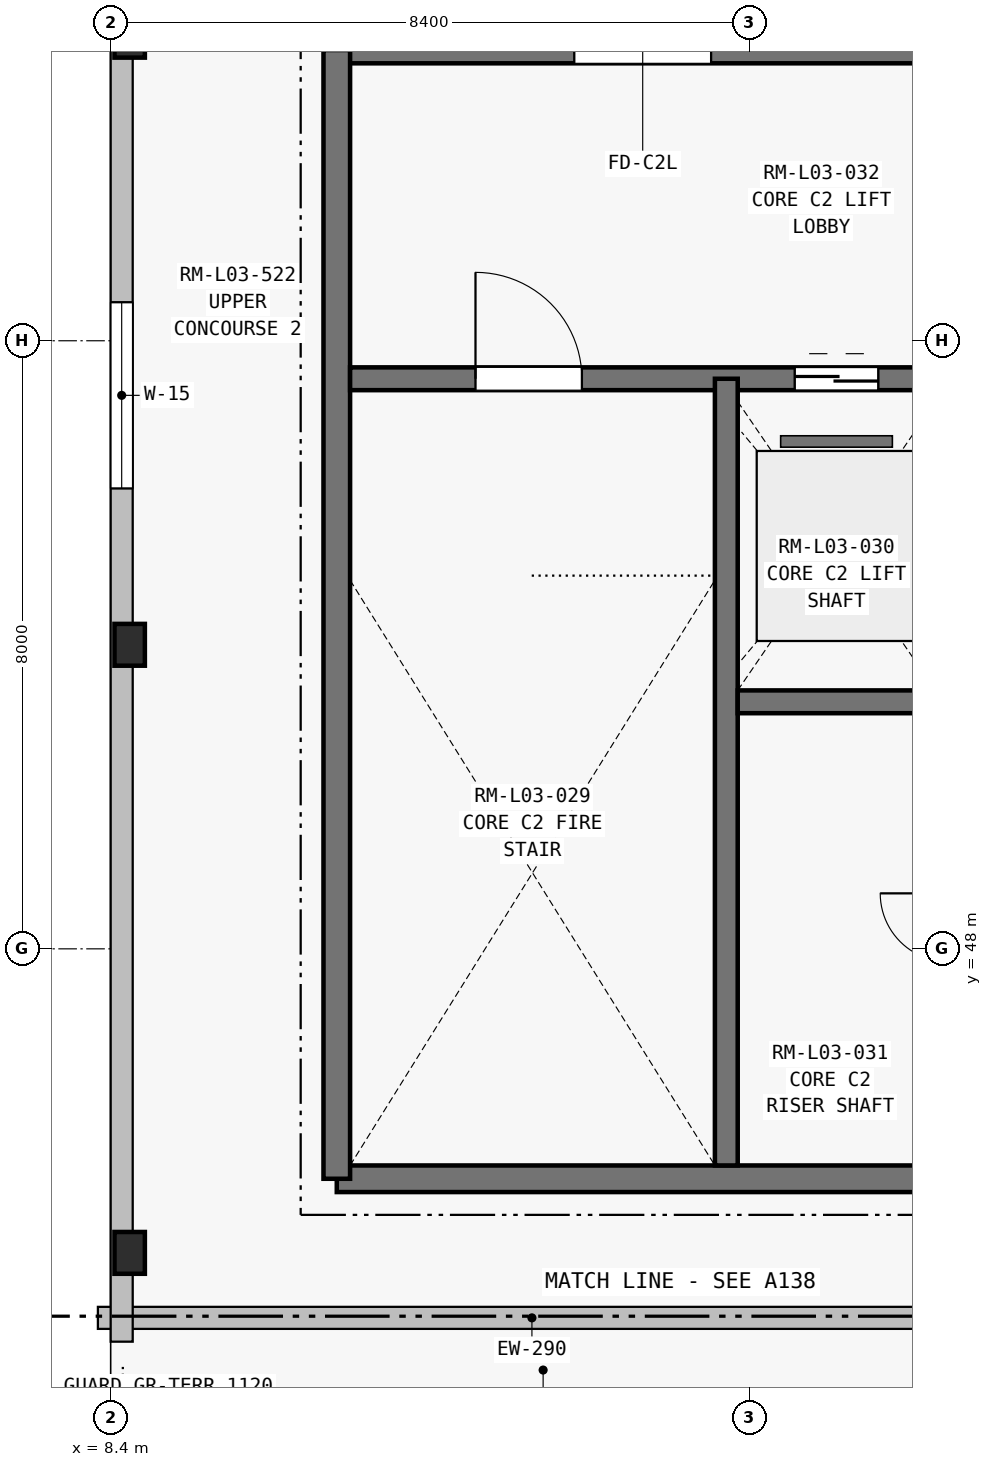
"""IFC4 building model, lengths in metres.
Left out: names, types, materials, properties, quantities, classifications, styles, units other than length and angle.
Written with IfcOpenShell. Run it as: python <this file> out.ifc"""

import sys

from ifc_helpers import new_model, si_unit, direction, frame, frame_2d, origin, origin_2d, place, context, subcontext, project, spatial, rectangle, extrude, element, fill, save


model = new_model("IFC4")
c1 = context("Model", 3, precision=1e-05, world=origin(), true_north=direction((0.0, 1.0)))
c2 = subcontext(c1, "Body", "Model", "MODEL_VIEW")
j1 = project(units=[si_unit("LENGTHUNIT", "METRE"), si_unit("PLANEANGLEUNIT", "RADIAN")], contexts=[c1])
p1 = place(None, origin())
s1 = spatial("IfcSite", under=j1, at=p1, CompositionType="ELEMENT")
p2 = place(p1, origin())
s2 = spatial("IfcBuilding", under=s1, at=p2, CompositionType="ELEMENT")
p3 = place(p2, frame((0.0, 0.0, 14.4)))
s3 = spatial("IfcBuildingStorey", under=s2, at=p3, CompositionType="ELEMENT", Elevation=14.4)
for number, where, z_axis, x_axis in (
    (1, (8.65, 44.0, 0.0), (0.0, 0.0, 1.0), (1.0, 0.0, 0.0)),
    (2, (8.65, 52.0, 0.0), (0.0, 0.0, 1.0), (1.0, 0.0, 0.0)),
    (3, (8.65, 60.0, 0.0), (0.0, 0.0, 1.0), (1.0, 0.0, 0.0)),
):
    element("IfcColumn", number, at=place(p3, frame(where, z_axis=z_axis, x_axis=x_axis)), inside=s3, PredefinedType="PILASTER", context=c2, shape_type="SweptSolid", body=[
        extrude(rectangle(XDim=0.4, YDim=0.55, at=origin_2d()), origin(), (0.0, 0.0, 1.0), 5.45),
    ])
p4 = place(p3, frame((19.653, 43.145, 0.0), z_axis=(0.0, 0.0, 1.0), x_axis=(-1.0, 0.0, 0.0)))
e4 = element("IfcWall", 4, at=p4, inside=s3, PredefinedType="SOLIDWALL", context=c2, shape_type="SweptSolid", body=[
    extrude(rectangle(XDim=11.421, YDim=0.29, at=frame_2d((5.711, 0.0))), origin(), (0.0, 0.0, 1.0), 4.26),
])
p5 = place(p3, frame((8.545, 42.832, 0.0), z_axis=(0.0, 0.0, 1.0), x_axis=(0.0, 1.0, 0.0)))
e5 = element("IfcWall", 5, at=p5, inside=s3, PredefinedType="SOLIDWALL", context=c2, shape_type="SweptSolid", body=[
    extrude(rectangle(XDim=42.336, YDim=0.29, at=frame_2d((21.168, 0.0))), origin(), (0.0, 0.0, 1.0), 4.26),
])
p6 = place(p5, frame((11.225, 0.0, 0.9)))
e6 = element("IfcOpeningElement", 6, at=p6, cuts=e5, PredefinedType="OPENING", context=c2, shape_type="SweptSolid", body=[
    extrude(rectangle(XDim=2.45, YDim=1.35, at=frame_2d((1.225, 0.675))), frame((0.0, 0.155, 0.0), z_axis=(0.0, -1.0, 0.0), x_axis=(1.0, 0.0, 0.0)), (0.0, 0.0, 1.0), 0.31),
])
p7 = place(p5, frame((21.225, 0.0, 0.9)))
e7 = element("IfcOpeningElement", 7, at=p7, cuts=e5, PredefinedType="OPENING", context=c2, shape_type="SweptSolid", body=[
    extrude(rectangle(XDim=0.85, YDim=2.1, at=frame_2d((0.425, 1.05))), frame((0.0, 0.155, 0.0), z_axis=(0.0, -1.0, 0.0), x_axis=(1.0, 0.0, 0.0)), (0.0, 0.0, 1.0), 0.31),
])
p8 = place(p5, frame((34.625, 0.0, 0.75)))
e8 = element("IfcOpeningElement", 8, at=p8, cuts=e5, PredefinedType="OPENING", context=c2, shape_type="SweptSolid", body=[
    extrude(rectangle(XDim=1.65, YDim=2.4, at=frame_2d((0.825, 1.2))), frame((0.0, 0.155, 0.0), z_axis=(0.0, -1.0, 0.0), x_axis=(1.0, 0.0, 0.0)), (0.0, 0.0, 1.0), 0.31),
])
p9 = place(p3, frame((11.375, 44.975, 0.0), z_axis=(0.0, 0.0, 1.0), x_axis=(1.0, 0.0, 0.0)))
e9 = element("IfcWall", 9, at=p9, inside=s3, PredefinedType="SHEAR", context=c2, shape_type="SweptSolid", body=[
    extrude(rectangle(XDim=8.05, YDim=0.35, at=frame_2d((4.025, 0.0))), origin(), (0.0, 0.0, 1.0), 4.5),
])
p10 = place(p3, frame((11.375, 59.825, 0.0), z_axis=(0.0, 0.0, 1.0), x_axis=(1.0, 0.0, 0.0)))
e10 = element("IfcWall", 10, at=p10, inside=s3, PredefinedType="SHEAR", context=c2, shape_type="SweptSolid", body=[
    extrude(rectangle(XDim=8.05, YDim=0.35, at=frame_2d((4.025, 0.0))), origin(), (0.0, 0.0, 1.0), 4.5),
])
p11 = place(p10, frame((3.125, 0.0, 0.0)))
e11 = element("IfcOpeningElement", 11, at=p11, cuts=e10, PredefinedType="OPENING", context=c2, shape_type="SweptSolid", body=[
    extrude(rectangle(XDim=1.8, YDim=2.25, at=frame_2d((0.9, 1.125))), frame((0.0, 0.185, 0.0), z_axis=(0.0, -1.0, 0.0), x_axis=(1.0, 0.0, 0.0)), (0.0, 0.0, 1.0), 0.37),
])
p12 = place(p3, frame((11.375, 44.975, 0.0), z_axis=(0.0, 0.0, 1.0), x_axis=(0.0, 1.0, 0.0)))
e12 = element("IfcWall", 12, at=p12, inside=s3, PredefinedType="SHEAR", context=c2, shape_type="SweptSolid", body=[
    extrude(rectangle(XDim=14.85, YDim=0.35, at=frame_2d((7.425, 0.0))), origin(), (0.0, 0.0, 1.0), 4.5),
])
p13 = place(p3, frame((11.55, 55.5, 0.0), z_axis=(0.0, 0.0, 1.0), x_axis=(1.0, 0.0, 0.0)))
e13 = element("IfcWall", 13, at=p13, inside=s3, PredefinedType="SHEAR", context=c2, shape_type="SweptSolid", body=[
    extrude(rectangle(XDim=7.7, YDim=0.3, at=frame_2d((3.85, 0.0))), origin(), (0.0, 0.0, 1.0), 4.5),
])
p14 = place(p13, frame((1.65, 0.0, 0.0)))
e14 = element("IfcOpeningElement", 14, at=p14, cuts=e13, PredefinedType="OPENING", context=c2, shape_type="SweptSolid", body=[
    extrude(rectangle(XDim=1.4, YDim=2.2, at=frame_2d((0.7, 1.1))), frame((0.0, 0.16, 0.0), z_axis=(0.0, -1.0, 0.0), x_axis=(1.0, 0.0, 0.0)), (0.0, 0.0, 1.0), 0.32),
])
p15 = place(p13, frame((5.85, 0.0, 0.0)))
e15 = element("IfcOpeningElement", 15, at=p15, cuts=e13, PredefinedType="OPENING", context=c2, shape_type="SweptSolid", body=[
    extrude(rectangle(XDim=1.1, YDim=2.2, at=frame_2d((0.55, 1.1))), frame((0.0, 0.16, 0.0), z_axis=(0.0, -1.0, 0.0), x_axis=(1.0, 0.0, 0.0)), (0.0, 0.0, 1.0), 0.32),
])
p16 = place(p3, frame((16.5, 45.15, 0.0), z_axis=(0.0, 0.0, 1.0), x_axis=(0.0, 1.0, 0.0)))
e16 = element("IfcWall", 16, at=p16, inside=s3, PredefinedType="SHEAR", context=c2, shape_type="SweptSolid", body=[
    extrude(rectangle(XDim=10.35, YDim=0.3, at=frame_2d((5.175, 0.0))), origin(), (0.0, 0.0, 1.0), 4.5),
])
p17 = place(p3, frame((16.65, 51.25, 0.0), z_axis=(0.0, 0.0, 1.0), x_axis=(1.0, 0.0, 0.0)))
e17 = element("IfcWall", 17, at=p17, inside=s3, PredefinedType="SHEAR", context=c2, shape_type="SweptSolid", body=[
    extrude(rectangle(XDim=2.6, YDim=0.3, at=frame_2d((1.3, 0.0))), origin(), (0.0, 0.0, 1.0), 4.5),
])
p18 = place(p6, origin())
e18 = element("IfcWindow", 18, at=p18, inside=s3, PartitioningType="SINGLE_PANEL", PredefinedType="WINDOW", context=c2, shape_type="SweptSolid", body=[
    extrude(rectangle(XDim=2.45, YDim=1.35, at=frame_2d((1.225, 0.675))), frame((0.0, 0.03, 0.0), z_axis=(0.0, -1.0, 0.0), x_axis=(1.0, 0.0, 0.0)), (0.0, 0.0, 1.0), 0.06),
])
fill(e6, e18)
p19 = place(p11, origin())
e19 = element("IfcDoor", 19, at=p19, inside=s3, OperationType="DOUBLE_DOOR_SINGLE_SWING", PredefinedType="DOOR", context=c2, shape_type="SweptSolid", body=[
    extrude(rectangle(XDim=1.8, YDim=2.25, at=frame_2d((0.9, 1.125))), frame((0.0, 0.025, 0.0), z_axis=(0.0, -1.0, 0.0), x_axis=(1.0, 0.0, 0.0)), (0.0, 0.0, 1.0), 0.05),
])
fill(e11, e19)
p20 = place(p14, origin())
e20 = element("IfcDoor", 20, at=p20, inside=s3, OperationType="SINGLE_SWING_LEFT", PredefinedType="DOOR", context=c2, shape_type="SweptSolid", body=[
    extrude(rectangle(XDim=1.4, YDim=2.2, at=frame_2d((0.7, 1.1))), frame((0.0, 0.025, 0.0), z_axis=(0.0, -1.0, 0.0), x_axis=(1.0, 0.0, 0.0)), (0.0, 0.0, 1.0), 0.05),
])
fill(e14, e20)
p21 = place(p15, origin())
e21 = element("IfcDoor", 21, at=p21, inside=s3, OperationType="SLIDING_TO_LEFT", PredefinedType="DOOR", context=c2, shape_type="SweptSolid", body=[
    extrude(rectangle(XDim=1.1, YDim=2.2, at=frame_2d((0.55, 1.1))), frame((0.0, 0.025, 0.0), z_axis=(0.0, -1.0, 0.0), x_axis=(1.0, 0.0, 0.0)), (0.0, 0.0, 1.0), 0.05),
])
fill(e15, e21)
save(model, sys.argv[1])
